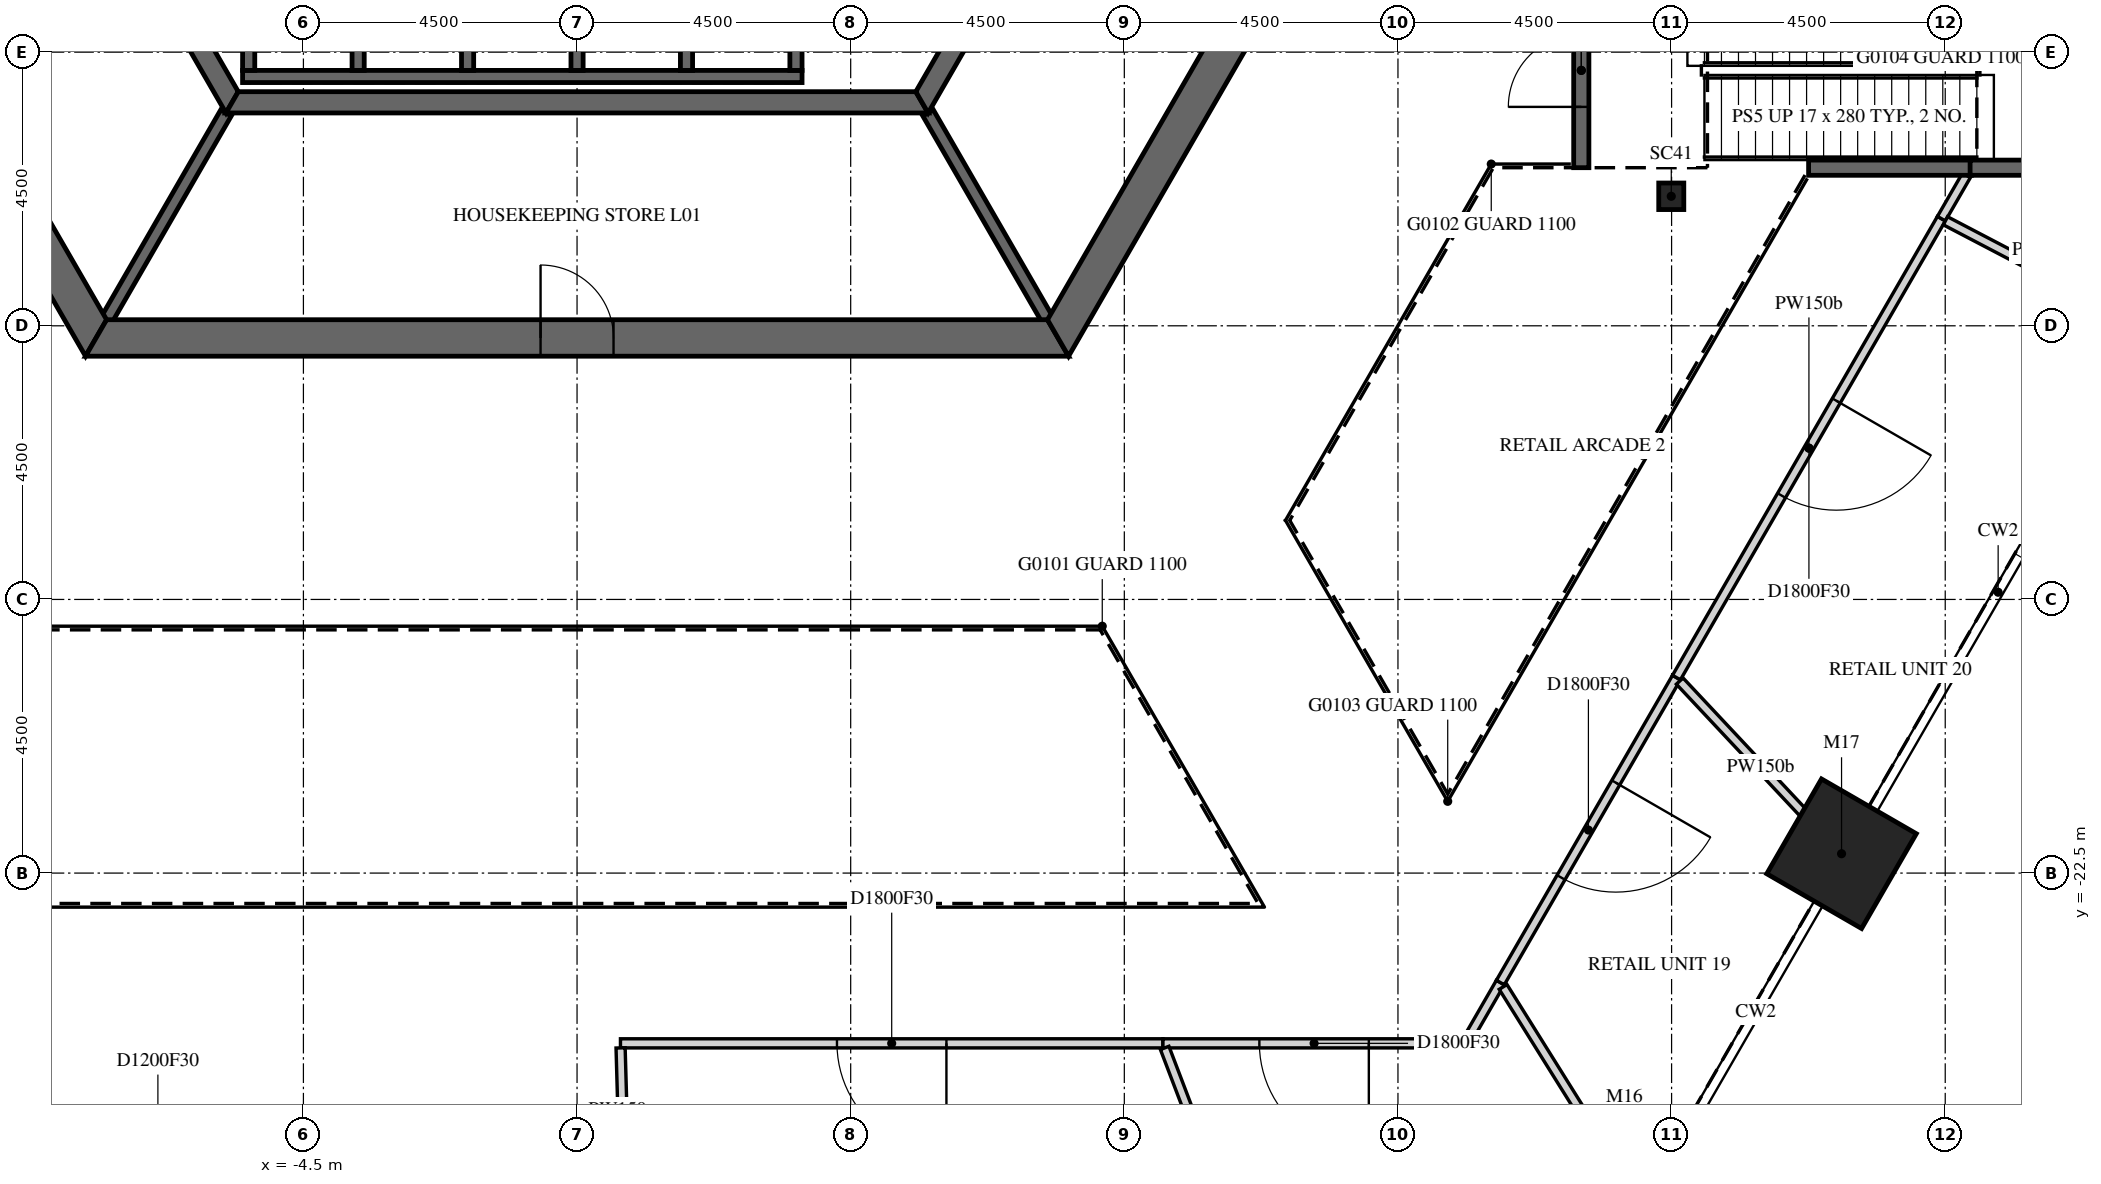
"""IFC4 building model, lengths in metres.
Left out: names, types, materials, properties, quantities, classifications, styles, units other than length and angle.
Written with IfcOpenShell. Run it as: python <this file> out.ifc"""

import sys

from ifc_helpers import new_model, si_unit, direction, frame, frame_2d, origin, origin_2d, place, context, subcontext, project, spatial, polyline, rectangle, i_section, outline, extrude, element, fill, save


model = new_model("IFC4")
c1 = context("Model", 3, precision=1e-05, world=origin(), true_north=direction((0.0, 1.0)))
c2 = subcontext(c1, "Body", "Model", "MODEL_VIEW")
j1 = project(units=[si_unit("LENGTHUNIT", "METRE"), si_unit("PLANEANGLEUNIT", "RADIAN")], contexts=[c1])
p1 = place(None, origin())
s1 = spatial("IfcSite", under=j1, at=p1, CompositionType="ELEMENT")
p2 = place(p1, origin())
s2 = spatial("IfcBuilding", under=s1, at=p2, CompositionType="ELEMENT")
p3 = place(p2, frame((0.0, 0.0, 9.0)))
s3 = spatial("IfcBuildingStorey", under=s2, at=p3, CompositionType="ELEMENT", Elevation=9.0)
p4 = place(p3, frame((20.795, -22.182, -0.25), z_axis=(0.0, 0.0, 1.0), x_axis=(-0.5, -0.866025403784, 0.0)))
e1 = element("IfcColumn", 1, at=p4, inside=s3, PredefinedType="COLUMN", context=c2, shape_type="SweptSolid", body=[
    extrude(rectangle(XDim=1.8, YDim=1.8, at=origin_2d()), origin(), (0.0, 0.0, 1.0), 6.0),
])
p5 = place(p3, frame((17.995, -11.37, -0.25), z_axis=(0.0, 0.0, 1.0), x_axis=(1.0, 0.0, 0.0)))
e2 = element("IfcColumn", 2, at=p5, inside=s3, PredefinedType="COLUMN", context=c2, shape_type="SweptSolid", body=[
    extrude(i_section(OverallWidth=0.412, OverallDepth=0.437, WebThickness=0.036, FlangeThickness=0.058, FilletRadius=0.015, at=origin_2d()), origin(), (0.0, 0.0, 1.0), 6.0),
])
p6 = place(p3, frame((-15.819, 0.0, -0.25), z_axis=(0.0, 0.0, 1.0), x_axis=(0.499999880136, -0.866025472988, 0.0)))
e3 = element("IfcWall", 3, at=p6, inside=s3, PredefinedType="SHEAR", context=c2, shape_type="SweptSolid", body=[
    extrude(outline(polyline([(-0.173, -0.3), (15.993, -0.3), (15.646, 0.3), (0.173, 0.3), (-0.173, -0.3)])), origin(), (0.0, 0.0, 1.0), 6.0),
])
p7 = place(p6, frame((6.981, 0.0, 0.25)))
e4 = element("IfcOpeningElement", 4, at=p7, cuts=e3, PredefinedType="OPENING", context=c2, shape_type="SweptSolid", body=[
    extrude(rectangle(XDim=1.8, YDim=2.4, at=frame_2d((0.9, 1.2))), frame((0.0, 0.31, 0.0), z_axis=(0.0, -1.0, 0.0), x_axis=(1.0, 0.0, 0.0)), (0.0, 0.0, 1.0), 0.62),
])
p8 = place(p3, frame((-7.91, -13.7, -0.25), z_axis=(0.0, 0.0, 1.0), x_axis=(1.0, 0.0, 0.0)))
e5 = element("IfcWall", 5, at=p8, inside=s3, PredefinedType="SHEAR", context=c2, shape_type="SweptSolid", body=[
    extrude(outline(polyline([(-0.173, -0.3), (15.993, -0.3), (15.646, 0.3), (0.173, 0.3), (-0.173, -0.3)])), origin(), (0.0, 0.0, 1.0), 6.0),
])
p9 = place(p8, frame((7.31, 0.0, 0.25)))
e6 = element("IfcOpeningElement", 6, at=p9, cuts=e5, PredefinedType="OPENING", context=c2, shape_type="SweptSolid", body=[
    extrude(rectangle(XDim=1.2, YDim=2.4, at=frame_2d((0.6, 1.2))), frame((0.0, 0.31, 0.0), z_axis=(0.0, -1.0, 0.0), x_axis=(1.0, 0.0, 0.0)), (0.0, 0.0, 1.0), 0.62),
])
p10 = place(p3, frame((7.91, -13.7, -0.25), z_axis=(0.0, 0.0, 1.0), x_axis=(0.499999880136, 0.866025472988, 0.0)))
e7 = element("IfcWall", 7, at=p10, inside=s3, PredefinedType="SHEAR", context=c2, shape_type="SweptSolid", body=[
    extrude(outline(polyline([(-0.173, -0.3), (15.993, -0.3), (15.646, 0.3), (0.173, 0.3), (-0.173, -0.3)])), origin(), (0.0, 0.0, 1.0), 6.0),
])
p11 = place(p10, frame((7.039, 0.0, 0.25)))
e8 = element("IfcOpeningElement", 8, at=p11, cuts=e7, PredefinedType="OPENING", context=c2, shape_type="SweptSolid", body=[
    extrude(rectangle(XDim=1.8, YDim=2.4, at=frame_2d((0.9, 1.2))), frame((0.0, 0.31, 0.0), z_axis=(0.0, -1.0, 0.0), x_axis=(1.0, 0.0, 0.0)), (0.0, 0.0, 1.0), 0.62),
])
p12 = place(p3, frame((-11.345, 0.0, -0.25), z_axis=(0.0, 0.0, 1.0), x_axis=(0.499995046907, -0.866028263435, 0.0)))
e9 = element("IfcWall", 9, at=p12, inside=s3, PredefinedType="SHEAR", context=c2, shape_type="SweptSolid", body=[
    extrude(outline(polyline([(-0.101, -0.175), (11.446, -0.175), (11.244, 0.175), (0.101, 0.175), (-0.101, -0.175)])), origin(), (0.0, 0.0, 1.0), 6.0),
])
p13 = place(p12, frame((4.744, 0.0, 0.25)))
e10 = element("IfcOpeningElement", 10, at=p13, cuts=e9, PredefinedType="OPENING", context=c2, shape_type="SweptSolid", body=[
    extrude(rectangle(XDim=1.8, YDim=2.4, at=frame_2d((0.9, 1.2))), frame((0.0, 0.185, 0.0), z_axis=(0.0, -1.0, 0.0), x_axis=(1.0, 0.0, 0.0)), (0.0, 0.0, 1.0), 0.37),
])
p14 = place(p3, frame((-5.673, -9.825, -0.25), z_axis=(0.0, 0.0, 1.0), x_axis=(1.0, 0.0, 0.0)))
e11 = element("IfcWall", 11, at=p14, inside=s3, PredefinedType="SHEAR", context=c2, shape_type="SweptSolid", body=[
    extrude(outline(polyline([(-0.101, -0.175), (11.446, -0.175), (11.244, 0.175), (0.101, 0.175), (-0.101, -0.175)])), origin(), (0.0, 0.0, 1.0), 6.0),
])
p15 = place(p3, frame((5.673, -9.825, -0.25), z_axis=(0.0, 0.0, 1.0), x_axis=(0.499995046907, 0.866028263435, 0.0)))
e12 = element("IfcWall", 12, at=p15, inside=s3, PredefinedType="SHEAR", context=c2, shape_type="SweptSolid", body=[
    extrude(outline(polyline([(-0.101, -0.175), (11.446, -0.175), (11.244, 0.175), (0.101, 0.175), (-0.101, -0.175)])), origin(), (0.0, 0.0, 1.0), 6.0),
])
p16 = place(p15, frame((4.801, 0.0, 0.25)))
e13 = element("IfcOpeningElement", 13, at=p16, cuts=e12, PredefinedType="OPENING", context=c2, shape_type="SweptSolid", body=[
    extrude(rectangle(XDim=1.8, YDim=2.4, at=frame_2d((0.9, 1.2))), frame((0.0, 0.185, 0.0), z_axis=(0.0, -1.0, 0.0), x_axis=(1.0, 0.0, 0.0)), (0.0, 0.0, 1.0), 0.37),
])
p17 = place(p3, frame((-5.5, -9.4, -0.25), z_axis=(0.0, 0.0, 1.0), x_axis=(1.0, 0.0, 0.0)))
e14 = element("IfcWall", 14, at=p17, inside=s3, PredefinedType="SHEAR", context=c2, shape_type="SweptSolid", body=[
    extrude(rectangle(XDim=9.2, YDim=0.2, at=frame_2d((4.6, 0.0))), origin(), (0.0, 0.0, 1.0), 6.0),
])
for number, where, z_axis, x_axis in (
    (15, (-5.4, -9.3, -0.25), (0.0, 0.0, 1.0), (0.0, 1.0, 0.0)),
    (16, (-3.6, -9.3, -0.25), (0.0, 0.0, 1.0), (0.0, 1.0, 0.0)),
    (17, (-1.8, -9.3, -0.25), (0.0, 0.0, 1.0), (0.0, 1.0, 0.0)),
    (18, (0.0, -9.3, -0.25), (0.0, 0.0, 1.0), (0.0, 1.0, 0.0)),
    (19, (1.8, -9.3, -0.25), (0.0, 0.0, 1.0), (0.0, 1.0, 0.0)),
    (20, (3.6, -9.3, -0.25), (0.0, 0.0, 1.0), (0.0, 1.0, 0.0)),
):
    element("IfcWall", number, at=place(p3, frame(where, z_axis=z_axis, x_axis=x_axis)), inside=s3, PredefinedType="SHEAR", context=c2, shape_type="SweptSolid", body=[
        extrude(rectangle(XDim=2.9, YDim=0.2, at=frame_2d((1.45, 0.0))), origin(), (0.0, 0.0, 1.0), 6.0),
    ])
for number, where, z_axis, x_axis in (
    (21, (-5.773, -10.0, -0.25), (0.0, 0.0, 1.0), (-0.5, -0.866, 0.0)),
    (22, (5.773, -10.0, -0.25), (0.0, 0.0, 1.0), (0.5, -0.866, 0.0)),
):
    element("IfcWall", number, at=place(p3, frame(where, z_axis=z_axis, x_axis=x_axis)), inside=s3, PredefinedType="SHEAR", context=c2, shape_type="SweptSolid", body=[
        extrude(rectangle(XDim=3.926, YDim=0.2, at=frame_2d((1.963, 0.0))), origin(), (0.0, 0.0, 1.0), 6.0),
    ])
p18 = place(p3, frame((9.635, -25.3, 0.0), z_axis=(0.0, 0.0, 1.0), x_axis=(-1.0, 0.0, 0.0)))
e23 = element("IfcWall", 23, at=p18, inside=s3, PredefinedType="PARTITIONING", context=c2, shape_type="SweptSolid", body=[
    extrude(rectangle(XDim=8.921, YDim=0.15, at=frame_2d((4.46, 0.0))), origin(), (0.0, 0.0, 1.0), 5.75),
])
p19 = place(p18, frame((3.561, 0.0, 0.0)))
e24 = element("IfcOpeningElement", 24, at=p19, cuts=e23, PredefinedType="OPENING", context=c2, shape_type="SweptSolid", body=[
    extrude(rectangle(XDim=1.8, YDim=2.1, at=frame_2d((0.9, 1.05))), frame((0.0, 0.085, 0.0), z_axis=(0.0, -1.0, 0.0), x_axis=(1.0, 0.0, 0.0)), (0.0, 0.0, 1.0), 0.17),
])
p20 = place(p3, frame((0.774, -27.41, 0.0), z_axis=(0.0, 0.0, 1.0), x_axis=(-0.028422825387, 0.999595989886, 0.0)))
e25 = element("IfcWall", 25, at=p20, inside=s3, PredefinedType="PARTITIONING", context=c2, shape_type="SweptSolid", body=[
    extrude(rectangle(XDim=2.036, YDim=0.15, at=frame_2d((1.018, 0.0))), origin(), (0.0, 0.0, 1.0), 4.996),
])
p21 = place(p3, frame((14.607, -25.3, 0.0), z_axis=(0.0, 0.0, 1.0), x_axis=(-1.0, 0.0, 0.0)))
e26 = element("IfcWall", 26, at=p21, inside=s3, PredefinedType="PARTITIONING", context=c2, shape_type="SweptSolid", body=[
    extrude(rectangle(XDim=4.972, YDim=0.15, at=frame_2d((2.486, 0.0))), origin(), (0.0, 0.0, 1.0), 5.75),
])
p22 = place(p21, frame((1.586, 0.0, 0.0)))
e27 = element("IfcOpeningElement", 27, at=p22, cuts=e26, PredefinedType="OPENING", context=c2, shape_type="SweptSolid", body=[
    extrude(rectangle(XDim=1.8, YDim=2.1, at=frame_2d((0.9, 1.05))), frame((0.0, 0.085, 0.0), z_axis=(0.0, -1.0, 0.0), x_axis=(1.0, 0.0, 0.0)), (0.0, 0.0, 1.0), 0.17),
])
p23 = place(p3, frame((10.821, -28.414, 0.0), z_axis=(0.0, 0.0, 1.0), x_axis=(-0.355923523558, 0.934515085688, 0.0)))
e28 = element("IfcWall", 28, at=p23, inside=s3, PredefinedType="PARTITIONING", context=c2, shape_type="SweptSolid", body=[
    extrude(rectangle(XDim=3.252, YDim=0.15, at=frame_2d((1.626, 0.0))), origin(), (0.0, 0.0, 1.0), 5.75),
])
p24 = place(p3, frame((14.65, -25.225, 0.0), z_axis=(0.0, 0.0, 1.0), x_axis=(0.49972905027, 0.86618178018, 0.0)))
e29 = element("IfcWall", 29, at=p24, inside=s3, PredefinedType="PARTITIONING", context=c2, shape_type="SweptSolid", body=[
    extrude(rectangle(XDim=1.068, YDim=0.15, at=frame_2d((0.534, 0.0))), origin(), (0.0, 0.0, 1.0), 5.75),
])
p25 = place(p3, frame((18.08, -19.285, 0.0), z_axis=(0.0, 0.0, 1.0), x_axis=(-0.500065471556, -0.865987600464, 0.0)))
e30 = element("IfcWall", 30, at=p25, inside=s3, PredefinedType="PARTITIONING", context=c2, shape_type="SweptSolid", body=[
    extrude(rectangle(XDim=5.791, YDim=0.15, at=frame_2d((2.896, 0.0))), origin(), (0.0, 0.0, 1.0), 5.75),
])
p26 = place(p25, frame((1.996, 0.0, 0.0)))
e31 = element("IfcOpeningElement", 31, at=p26, cuts=e30, PredefinedType="OPENING", context=c2, shape_type="SweptSolid", body=[
    extrude(rectangle(XDim=1.8, YDim=2.1, at=frame_2d((0.9, 1.05))), frame((0.0, 0.085, 0.0), z_axis=(0.0, -1.0, 0.0), x_axis=(1.0, 0.0, 0.0)), (0.0, 0.0, 1.0), 0.17),
])
p27 = place(p3, frame((16.515, -10.9, 0.0), z_axis=(0.0, 0.0, 1.0), x_axis=(0.0, 1.0, 0.0)))
e32 = element("IfcWall", 32, at=p27, inside=s3, PredefinedType="PARTITIONING", context=c2, shape_type="SweptSolid", body=[
    extrude(rectangle(XDim=3.2, YDim=0.25, at=frame_2d((1.6, 0.0))), origin(), (0.0, 0.0, 1.0), 5.75),
])
p28 = place(p27, frame((1.0, 0.0, 0.0)))
e33 = element("IfcOpeningElement", 33, at=p28, cuts=e32, PredefinedType="OPENING", context=c2, shape_type="SweptSolid", body=[
    extrude(rectangle(XDim=1.2, YDim=2.1, at=frame_2d((0.6, 1.05))), frame((0.0, 0.135, 0.0), z_axis=(0.0, -1.0, 0.0), x_axis=(1.0, 0.0, 0.0)), (0.0, 0.0, 1.0), 0.27),
])
p29 = place(p3, frame((17.225, -27.566, 0.0), z_axis=(0.0, 0.0, 1.0), x_axis=(-0.529987286502, 0.848005587332, 0.0)))
e34 = element("IfcWall", 34, at=p29, inside=s3, PredefinedType="PARTITIONING", context=c2, shape_type="SweptSolid", body=[
    extrude(rectangle(XDim=3.766, YDim=0.15, at=frame_2d((1.883, 0.0))), origin(), (0.0, 0.0, 1.0), 4.988),
])
p30 = place(p3, frame((22.437, -11.738, 0.0), z_axis=(0.0, 0.0, 1.0), x_axis=(-0.499977905081, -0.866038159916, 0.0)))
e35 = element("IfcWall", 35, at=p30, inside=s3, PredefinedType="PARTITIONING", context=c2, shape_type="SweptSolid", body=[
    extrude(rectangle(XDim=8.714, YDim=0.15, at=frame_2d((4.357, 0.0))), origin(), (0.0, 0.0, 1.0), 5.75),
])
p31 = place(p30, frame((3.457, 0.0, 0.0)))
e36 = element("IfcOpeningElement", 36, at=p31, cuts=e35, PredefinedType="OPENING", context=c2, shape_type="SweptSolid", body=[
    extrude(rectangle(XDim=1.8, YDim=2.1, at=frame_2d((0.9, 1.05))), frame((0.0, 0.085, 0.0), z_axis=(0.0, -1.0, 0.0), x_axis=(1.0, 0.0, 0.0)), (0.0, 0.0, 1.0), 0.17),
])
p32 = place(p3, frame((20.795, -22.182, 0.0), z_axis=(0.0, 0.0, 1.0), x_axis=(-0.683838873314, 0.729633055271, 0.0)))
e37 = element("IfcWall", 37, at=p32, inside=s3, PredefinedType="PARTITIONING", context=c2, shape_type="SweptSolid", body=[
    extrude(rectangle(XDim=3.892, YDim=0.15, at=frame_2d((1.946, 0.0))), origin(), (0.0, 0.0, 1.0), 5.75),
])
p33 = place(p3, frame((22.437, -11.738, 0.0), z_axis=(0.0, 0.0, 1.0), x_axis=(0.500124476847, 0.865953525115, 0.0)))
e38 = element("IfcWall", 38, at=p33, inside=s3, PredefinedType="PARTITIONING", context=c2, shape_type="SweptSolid", body=[
    extrude(rectangle(XDim=0.823, YDim=0.15, at=frame_2d((0.412, 0.0))), origin(), (0.0, 0.0, 1.0), 5.75),
])
p34 = place(p3, frame((22.931, -10.9, 0.0), z_axis=(0.0, 0.0, 1.0), x_axis=(-1.0, 0.0, 0.0)))
e39 = element("IfcWall", 39, at=p34, inside=s3, PredefinedType="PARTITIONING", context=c2, shape_type="SweptSolid", body=[
    extrude(rectangle(XDim=2.678, YDim=0.25, at=frame_2d((1.339, 0.0))), origin(), (0.0, 0.0, 1.0), 5.75),
])
p35 = place(p3, frame((25.807, -13.501, 0.0), z_axis=(0.0, 0.0, 1.0), x_axis=(-0.886064695704, 0.463561597878, 0.0)))
e40 = element("IfcWall", 40, at=p35, inside=s3, PredefinedType="PARTITIONING", context=c2, shape_type="SweptSolid", body=[
    extrude(rectangle(XDim=3.728, YDim=0.15, at=frame_2d((1.864, 0.0))), origin(), (0.0, 0.0, 1.0), 5.297),
])
p36 = place(p3, frame((26.785, -10.9, 0.0), z_axis=(0.0, 0.0, 1.0), x_axis=(-1.0, 0.0, 0.0)))
e41 = element("IfcWall", 41, at=p36, inside=s3, PredefinedType="PARTITIONING", context=c2, shape_type="SweptSolid", body=[
    extrude(rectangle(XDim=3.876, YDim=0.25, at=frame_2d((1.938, 0.0))), origin(), (0.0, 0.0, 1.0), 5.75),
])
p37 = place(p9, origin())
e42 = element("IfcDoor", 42, at=p37, inside=s3, OperationType="SINGLE_SWING_LEFT", PredefinedType="DOOR", context=c2, shape_type="SweptSolid", body=[
    extrude(rectangle(XDim=1.2, YDim=2.4, at=frame_2d((0.6, 1.2))), frame((0.0, 0.025, 0.0), z_axis=(0.0, -1.0, 0.0), x_axis=(1.0, 0.0, 0.0)), (0.0, 0.0, 1.0), 0.05),
])
fill(e6, e42)
p38 = place(p19, origin())
e43 = element("IfcDoor", 43, at=p38, inside=s3, OperationType="DOUBLE_DOOR_SINGLE_SWING", PredefinedType="DOOR", context=c2, shape_type="SweptSolid", body=[
    extrude(rectangle(XDim=1.8, YDim=2.1, at=frame_2d((0.9, 1.05))), frame((0.0, 0.025, 0.0), z_axis=(0.0, -1.0, 0.0), x_axis=(1.0, 0.0, 0.0)), (0.0, 0.0, 1.0), 0.05),
])
fill(e24, e43)
p39 = place(p22, origin())
e44 = element("IfcDoor", 44, at=p39, inside=s3, OperationType="DOUBLE_DOOR_SINGLE_SWING", PredefinedType="DOOR", context=c2, shape_type="SweptSolid", body=[
    extrude(rectangle(XDim=1.8, YDim=2.1, at=frame_2d((0.9, 1.05))), frame((0.0, 0.025, 0.0), z_axis=(0.0, -1.0, 0.0), x_axis=(1.0, 0.0, 0.0)), (0.0, 0.0, 1.0), 0.05),
])
fill(e27, e44)
p40 = place(p26, origin())
e45 = element("IfcDoor", 45, at=p40, inside=s3, OperationType="DOUBLE_DOOR_SINGLE_SWING", PredefinedType="DOOR", context=c2, shape_type="SweptSolid", body=[
    extrude(rectangle(XDim=1.8, YDim=2.1, at=frame_2d((0.9, 1.05))), frame((0.0, 0.025, 0.0), z_axis=(0.0, -1.0, 0.0), x_axis=(1.0, 0.0, 0.0)), (0.0, 0.0, 1.0), 0.05),
])
fill(e31, e45)
p41 = place(p28, origin())
e46 = element("IfcDoor", 46, at=p41, inside=s3, OperationType="SINGLE_SWING_LEFT", PredefinedType="DOOR", context=c2, shape_type="SweptSolid", body=[
    extrude(rectangle(XDim=1.2, YDim=2.1, at=frame_2d((0.6, 1.05))), frame((0.0, 0.025, 0.0), z_axis=(0.0, -1.0, 0.0), x_axis=(1.0, 0.0, 0.0)), (0.0, 0.0, 1.0), 0.05),
])
fill(e33, e46)
p42 = place(p31, origin())
e47 = element("IfcDoor", 47, at=p42, inside=s3, OperationType="DOUBLE_DOOR_SINGLE_SWING", PredefinedType="DOOR", context=c2, shape_type="SweptSolid", body=[
    extrude(rectangle(XDim=1.8, YDim=2.1, at=frame_2d((0.9, 1.05))), frame((0.0, 0.025, 0.0), z_axis=(0.0, -1.0, 0.0), x_axis=(1.0, 0.0, 0.0)), (0.0, 0.0, 1.0), 0.05),
])
fill(e36, e47)
save(model, sys.argv[1])
